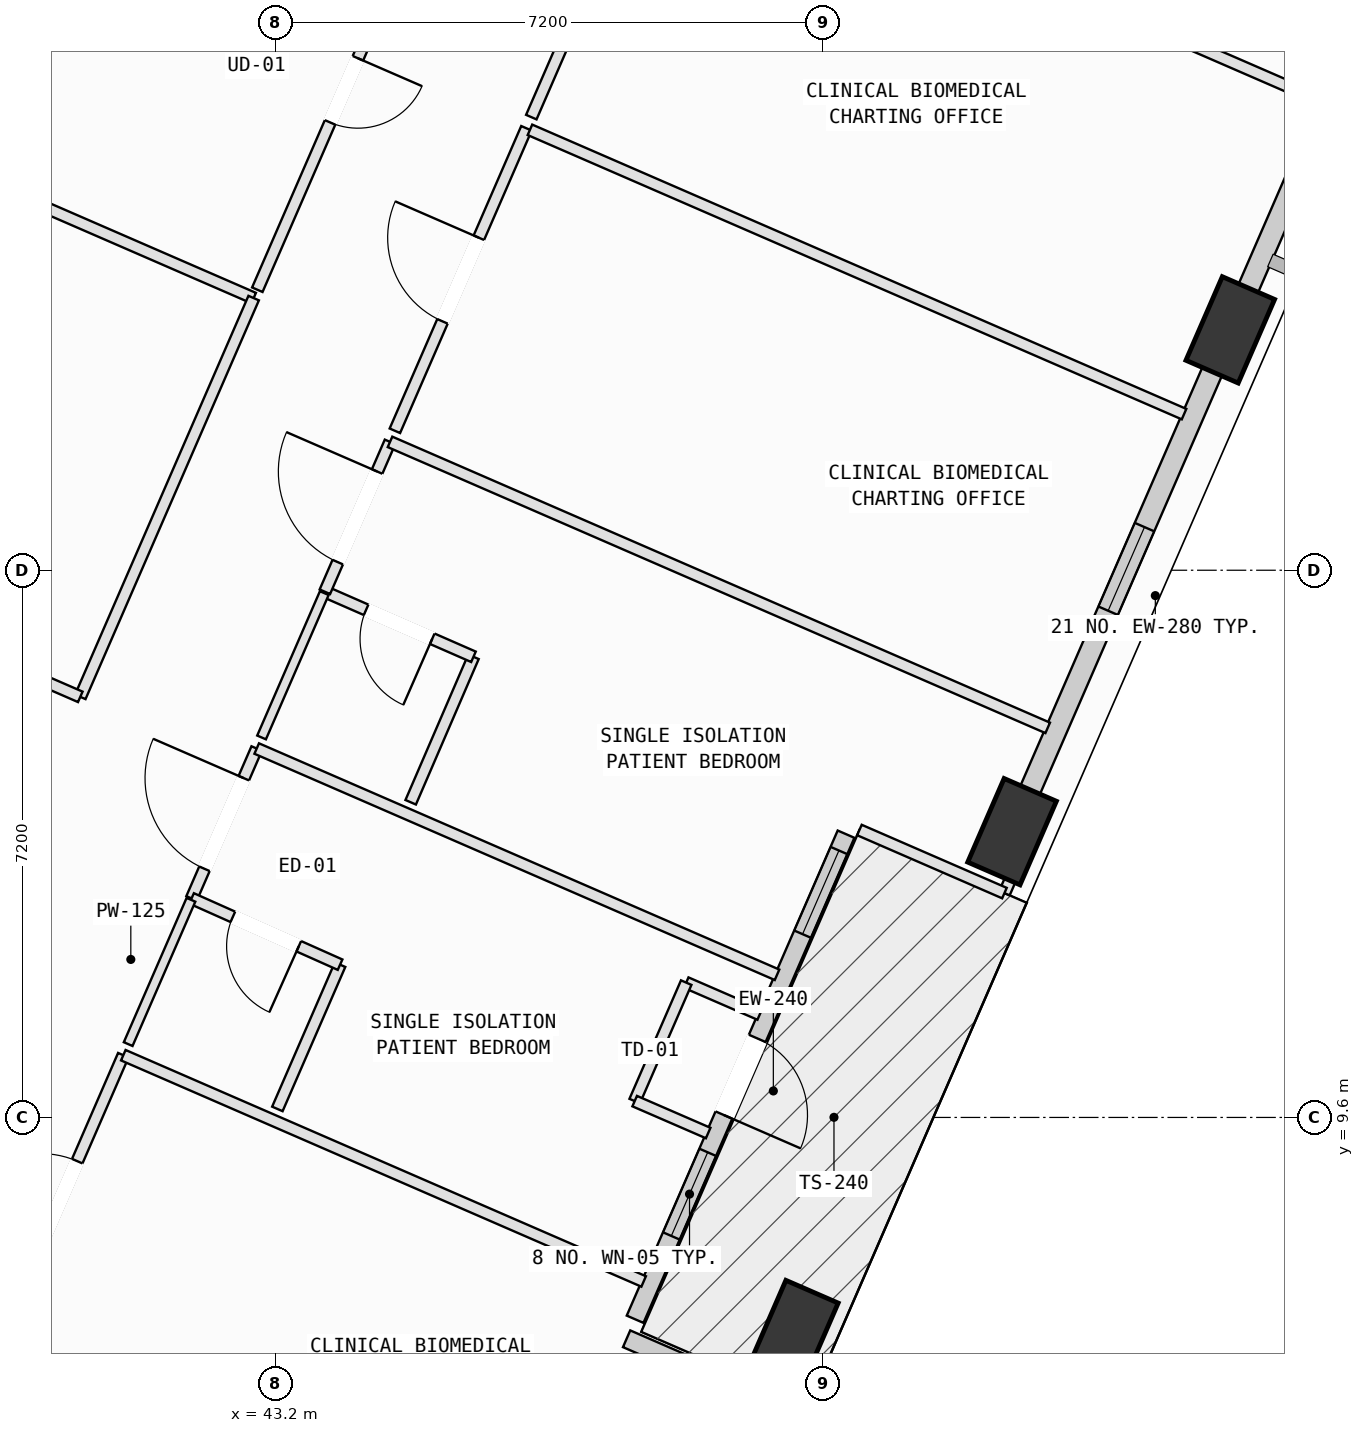
"""IFC4 building model, lengths in metres.
Left out: names, types, materials, properties, quantities, classifications, styles, units other than length and angle.
Written with IfcOpenShell. Run it as: python <this file> out.ifc"""

import sys

from ifc_helpers import new_model, si_unit, direction, frame, frame_2d, origin, origin_2d, place, context, subcontext, project, spatial, rectangle, extrude, element, fill, save


model = new_model("IFC4")
c1 = context("Model", 3, precision=1e-05, world=origin(), true_north=direction((0.0, 1.0)))
c2 = subcontext(c1, "Body", "Model", "MODEL_VIEW")
j1 = project(units=[si_unit("LENGTHUNIT", "METRE"), si_unit("PLANEANGLEUNIT", "RADIAN")], contexts=[c1])
p1 = place(None, origin())
s1 = spatial("IfcSite", under=j1, at=p1, CompositionType="ELEMENT")
p2 = place(p1, origin())
s2 = spatial("IfcBuilding", under=s1, at=p2, CompositionType="ELEMENT")
p3 = place(p2, frame((0.0, 0.0, 320.6)))
s3 = spatial("IfcBuildingStorey", under=s2, at=p3, CompositionType="ELEMENT", Elevation=320.6)
for number, where, z_axis, x_axis in (
    (1, (50.017, 6.757, 0.002), (0.0, 0.0, 1.0), (0.399, 0.917, 0.0)),
    (2, (52.888, 13.36, 0.002), (0.0, 0.0, 1.0), (0.399, 0.917, 0.0)),
    (3, (55.759, 19.963, 0.002), (0.0, 0.0, 1.0), (0.399, 0.917, 0.0)),
):
    element("IfcColumn", number, at=place(p3, frame(where, z_axis=z_axis, x_axis=x_axis)), inside=s3, PredefinedType="COLUMN", context=c2, shape_type="SweptSolid", body=[
        extrude(rectangle(XDim=1.2, YDim=0.75, at=origin_2d()), origin(), (0.0, 0.0, 1.0), 3.996),
    ])
p4 = place(p3, frame((50.704, 13.327, 0.0), z_axis=(0.0, 0.0, 1.0), x_axis=(-0.398727394062, -0.917069498579, 0.0)))
e4 = element("IfcWall", 4, at=p4, inside=s3, PredefinedType="SOLIDWALL", context=c2, shape_type="SweptSolid", body=[
    extrude(rectangle(XDim=6.96, YDim=0.24, at=frame_2d((3.48, 0.0))), origin(), (0.0, 0.0, 1.0), 3.265),
])
p5 = place(p4, frame((2.93, 0.0, 0.0)))
e5 = element("IfcOpeningElement", 5, at=p5, cuts=e4, PredefinedType="OPENING", context=c2, shape_type="SweptSolid", body=[
    extrude(rectangle(XDim=1.1, YDim=2.15, at=frame_2d((0.55, 1.075))), frame((0.0, 0.13, 0.0), z_axis=(0.0, -1.0, 0.0), x_axis=(1.0, 0.0, 0.0)), (0.0, 0.0, 1.0), 0.26),
])
p6 = place(p4, frame((4.564, 0.0, 0.75)))
e6 = element("IfcOpeningElement", 6, at=p6, cuts=e4, PredefinedType="OPENING", context=c2, shape_type="SweptSolid", body=[
    extrude(rectangle(XDim=1.2, YDim=1.75, at=frame_2d((0.6, 0.875))), frame((0.0, 0.13, 0.0), z_axis=(0.0, -1.0, 0.0), x_axis=(1.0, 0.0, 0.0)), (0.0, 0.0, 1.0), 0.26),
])
p7 = place(p4, frame((0.235, 0.0, 0.75)))
e7 = element("IfcOpeningElement", 7, at=p7, cuts=e4, PredefinedType="OPENING", context=c2, shape_type="SweptSolid", body=[
    extrude(rectangle(XDim=1.2, YDim=1.75, at=frame_2d((0.6, 0.875))), frame((0.0, 0.13, 0.0), z_axis=(0.0, -1.0, 0.0), x_axis=(1.0, 0.0, 0.0)), (0.0, 0.0, 1.0), 0.26),
])
p8 = place(p3, frame((47.817, 6.688, 0.0), z_axis=(0.0, 0.0, 1.0), x_axis=(0.917071608779, -0.398722540586, 0.0)))
e8 = element("IfcWall", 8, at=p8, inside=s3, PredefinedType="SOLIDWALL", context=c2, shape_type="SweptSolid", body=[
    extrude(rectangle(XDim=2.5, YDim=0.24, at=frame_2d((1.25, 0.0))), origin(), (0.0, 0.0, 1.0), 2.765),
])
p9 = place(p3, frame((55.601, 19.598, 0.0), z_axis=(0.0, 0.0, 1.0), x_axis=(-0.398744230651, -0.917062178112, 0.0)))
e9 = element("IfcWall", 9, at=p9, inside=s3, PredefinedType="SOLIDWALL", context=c2, shape_type="SweptSolid", body=[
    extrude(rectangle(XDim=6.405, YDim=0.28, at=frame_2d((3.203, 0.0))), origin(), (0.0, 0.0, 1.0), 3.245),
])
p10 = place(p9, frame((2.432, 0.0, 0.75)))
e10 = element("IfcOpeningElement", 10, at=p10, cuts=e9, PredefinedType="OPENING", context=c2, shape_type="SweptSolid", body=[
    extrude(rectangle(XDim=1.2, YDim=1.75, at=frame_2d((0.6, 0.875))), frame((0.0, 0.15, 0.0), z_axis=(0.0, -1.0, 0.0), x_axis=(1.0, 0.0, 0.0)), (0.0, 0.0, 1.0), 0.3),
])
p11 = place(p3, frame((58.472, 26.201, 0.0), z_axis=(0.0, 0.0, 1.0), x_axis=(-0.398776286617, -0.917048239316, 0.0)))
e11 = element("IfcWall", 11, at=p11, inside=s3, PredefinedType="SOLIDWALL", context=c2, shape_type="SweptSolid", body=[
    extrude(rectangle(XDim=6.405, YDim=0.28, at=frame_2d((3.203, 0.0))), origin(), (0.0, 0.0, 1.0), 3.245),
])
p12 = place(p11, frame((0.796, 0.0, 0.75)))
e12 = element("IfcOpeningElement", 12, at=p12, cuts=e11, PredefinedType="OPENING", context=c2, shape_type="SweptSolid", body=[
    extrude(rectangle(XDim=1.6, YDim=1.95, at=frame_2d((0.8, 0.975))), frame((0.0, 0.15, 0.0), z_axis=(0.0, -1.0, 0.0), x_axis=(1.0, 0.0, 0.0)), (0.0, 0.0, 1.0), 0.3),
])
p13 = place(p3, frame((39.505, 6.53, 0.0), z_axis=(0.0, 0.0, 1.0), x_axis=(0.398597683129, 0.917125883946, 0.0)))
e13 = element("IfcWall", 13, at=p13, inside=s3, PredefinedType="PARTITIONING", context=c2, shape_type="SweptSolid", body=[
    extrude(rectangle(XDim=4.24, YDim=0.15, at=frame_2d((2.12, 0.0))), origin(), (0.0, 0.0, 1.0), 3.78),
])
p14 = place(p13, frame((1.52, 0.0, 0.0)))
e14 = element("IfcOpeningElement", 14, at=p14, cuts=e13, PredefinedType="OPENING", context=c2, shape_type="SweptSolid", body=[
    extrude(rectangle(XDim=1.2, YDim=2.15, at=frame_2d((0.6, 1.075))), frame((0.0, 0.085, 0.0), z_axis=(0.0, -1.0, 0.0), x_axis=(1.0, 0.0, 0.0)), (0.0, 0.0, 1.0), 0.17),
])
p15 = place(p3, frame((41.195, 10.419, 0.0), z_axis=(0.0, 0.0, 1.0), x_axis=(0.917043017742, -0.398788294224, 0.0)))
e15 = element("IfcWall", 15, at=p15, inside=s3, PredefinedType="PARTITIONING", context=c2, shape_type="SweptSolid", body=[
    extrude(rectangle(XDim=7.465, YDim=0.15, at=frame_2d((3.733, 0.0))), origin(), (0.0, 0.0, 1.0), 3.78),
])
p16 = place(p3, frame((42.093, 12.482, 0.0), z_axis=(0.0, 0.0, 1.0), x_axis=(0.398518519728, 0.917160285574, 0.0)))
e16 = element("IfcWall", 16, at=p16, inside=s3, PredefinedType="PARTITIONING", context=c2, shape_type="SweptSolid", body=[
    extrude(rectangle(XDim=2.15, YDim=0.15, at=frame_2d((1.075, 0.0))), origin(), (0.0, 0.0, 1.0), 3.78),
])
p17 = place(p16, frame((0.425, 0.0, 0.0)))
e17 = element("IfcOpeningElement", 17, at=p17, cuts=e16, PredefinedType="OPENING", context=c2, shape_type="SweptSolid", body=[
    extrude(rectangle(XDim=1.3, YDim=2.15, at=frame_2d((0.65, 1.075))), frame((0.0, 0.085, 0.0), z_axis=(0.0, -1.0, 0.0), x_axis=(1.0, 0.0, 0.0)), (0.0, 0.0, 1.0), 0.17),
])
p18 = place(p3, frame((42.95, 14.454, 0.0), z_axis=(0.0, 0.0, 1.0), x_axis=(0.917043017742, -0.398788294224, 0.0)))
e18 = element("IfcWall", 18, at=p18, inside=s3, PredefinedType="PARTITIONING", context=c2, shape_type="SweptSolid", body=[
    extrude(rectangle(XDim=7.465, YDim=0.15, at=frame_2d((3.733, 0.0))), origin(), (0.0, 0.0, 1.0), 3.78),
])
p19 = place(p3, frame((49.568, 10.954, 0.0), z_axis=(0.0, 0.0, 1.0), x_axis=(-0.917254037481, 0.398302687318, 0.0)))
e19 = element("IfcWall", 19, at=p19, inside=s3, PredefinedType="PARTITIONING", context=c2, shape_type="SweptSolid", body=[
    extrude(rectangle(XDim=1.054, YDim=0.15, at=frame_2d((0.527, 0.0))), origin(), (0.0, 0.0, 1.0), 3.78),
])
p20 = place(p3, frame((48.601, 11.374, 0.0), z_axis=(0.0, 0.0, 1.0), x_axis=(-0.398783871208, -0.917044941137, 0.0)))
e20 = element("IfcWall", 20, at=p20, inside=s3, PredefinedType="PARTITIONING", context=c2, shape_type="SweptSolid", body=[
    extrude(rectangle(XDim=1.7, YDim=0.15, at=frame_2d((0.85, 0.0))), origin(), (0.0, 0.0, 1.0), 3.78),
])
p21 = place(p3, frame((47.923, 9.815, 0.0), z_axis=(0.0, 0.0, 1.0), x_axis=(0.917217288132, -0.398387306966, 0.0)))
e21 = element("IfcWall", 21, at=p21, inside=s3, PredefinedType="PARTITIONING", context=c2, shape_type="SweptSolid", body=[
    extrude(rectangle(XDim=1.054, YDim=0.15, at=frame_2d((0.527, 0.0))), origin(), (0.0, 0.0, 1.0), 3.78),
])
p22 = place(p3, frame((43.222, 9.712, 0.0), z_axis=(0.0, 0.0, 1.0), x_axis=(0.398682980107, 0.91708880779, 0.0)))
e22 = element("IfcWall", 22, at=p22, inside=s3, PredefinedType="PARTITIONING", context=c2, shape_type="SweptSolid", body=[
    extrude(rectangle(XDim=2.07, YDim=0.15, at=frame_2d((1.035, 0.0))), origin(), (0.0, 0.0, 1.0), 3.415),
])
p23 = place(p3, frame((44.047, 11.61, 0.0), z_axis=(0.0, 0.0, 1.0), x_axis=(-0.913231902411, 0.407440170354, 0.0)))
e23 = element("IfcWall", 23, at=p23, inside=s3, PredefinedType="PARTITIONING", context=c2, shape_type="SweptSolid", body=[
    extrude(rectangle(XDim=2.14, YDim=0.15, at=frame_2d((1.07, 0.0))), origin(), (0.0, 0.0, 1.0), 3.78),
])
p24 = place(p23, frame((0.595, 0.0, 0.0)))
e24 = element("IfcOpeningElement", 24, at=p24, cuts=e23, PredefinedType="OPENING", context=c2, shape_type="SweptSolid", body=[
    extrude(rectangle(XDim=0.95, YDim=2.1, at=frame_2d((0.475, 1.05))), frame((0.0, 0.085, 0.0), z_axis=(0.0, -1.0, 0.0), x_axis=(1.0, 0.0, 0.0)), (0.0, 0.0, 1.0), 0.17),
])
p25 = place(p3, frame((41.259, 10.565, 0.0), z_axis=(0.0, 0.0, 1.0), x_axis=(0.398808011477, 0.917034443182, 0.0)))
e25 = element("IfcWall", 25, at=p25, inside=s3, PredefinedType="PARTITIONING", context=c2, shape_type="SweptSolid", body=[
    extrude(rectangle(XDim=2.071, YDim=0.125, at=frame_2d((1.036, 0.0))), origin(), (0.0, 0.0, 1.0), 3.78),
])
p26 = place(p3, frame((44.976, 13.747, 0.0), z_axis=(0.0, 0.0, 1.0), x_axis=(0.396236327193, 0.918148557159, 0.0)))
e26 = element("IfcWall", 26, at=p26, inside=s3, PredefinedType="PARTITIONING", context=c2, shape_type="SweptSolid", body=[
    extrude(rectangle(XDim=2.084, YDim=0.15, at=frame_2d((1.042, 0.0))), origin(), (0.0, 0.0, 1.0), 3.78),
])
p27 = place(p3, frame((45.802, 15.661, 0.0), z_axis=(0.0, 0.0, 1.0), x_axis=(-0.916010257987, 0.401154842003, 0.0)))
e27 = element("IfcWall", 27, at=p27, inside=s3, PredefinedType="PARTITIONING", context=c2, shape_type="SweptSolid", body=[
    extrude(rectangle(XDim=2.134, YDim=0.15, at=frame_2d((1.067, 0.0))), origin(), (0.0, 0.0, 1.0), 3.78),
])
p28 = place(p27, frame((0.592, 0.0, 0.0)))
e28 = element("IfcOpeningElement", 28, at=p28, cuts=e27, PredefinedType="OPENING", context=c2, shape_type="SweptSolid", body=[
    extrude(rectangle(XDim=0.95, YDim=2.1, at=frame_2d((0.475, 1.05))), frame((0.0, 0.085, 0.0), z_axis=(0.0, -1.0, 0.0), x_axis=(1.0, 0.0, 0.0)), (0.0, 0.0, 1.0), 0.17),
])
p29 = place(p3, frame((43.847, 16.517, 0.0), z_axis=(0.0, 0.0, 1.0), x_axis=(0.398655528378, 0.917100741301, 0.0)))
e29 = element("IfcWall", 29, at=p29, inside=s3, PredefinedType="PARTITIONING", context=c2, shape_type="SweptSolid", body=[
    extrude(rectangle(XDim=2.15, YDim=0.15, at=frame_2d((1.075, 0.0))), origin(), (0.0, 0.0, 1.0), 3.78),
])
p30 = place(p29, frame((0.425, 0.0, 0.0)))
e30 = element("IfcOpeningElement", 30, at=p30, cuts=e29, PredefinedType="OPENING", context=c2, shape_type="SweptSolid", body=[
    extrude(rectangle(XDim=1.3, YDim=2.15, at=frame_2d((0.65, 1.075))), frame((0.0, 0.085, 0.0), z_axis=(0.0, -1.0, 0.0), x_axis=(1.0, 0.0, 0.0)), (0.0, 0.0, 1.0), 0.17),
])
p31 = place(p3, frame((44.704, 18.489, 0.0), z_axis=(0.0, 0.0, 1.0), x_axis=(0.917037556052, -0.398800853547, 0.0)))
e31 = element("IfcWall", 31, at=p31, inside=s3, PredefinedType="PARTITIONING", context=c2, shape_type="SweptSolid", body=[
    extrude(rectangle(XDim=9.436, YDim=0.15, at=frame_2d((4.718, 0.0))), origin(), (0.0, 0.0, 1.0), 3.78),
])
p32 = place(p3, frame((53.258, 13.633, 0.0), z_axis=(0.0, 0.0, 1.0), x_axis=(-0.398688245034, -0.917086518967, 0.0)))
e32 = element("IfcWall", 32, at=p32, inside=s3, PredefinedType="PARTITIONING", context=c2, shape_type="SweptSolid", body=[
    extrude(rectangle(XDim=1.179, YDim=0.15, at=frame_2d((0.589, 0.0))), origin(), (0.0, 0.0, 1.0), 3.245),
])
p33 = place(p3, frame((52.788, 12.552, 0.0), z_axis=(0.0, 0.0, 1.0), x_axis=(-0.91699543107, 0.39889770543, 0.0)))
e33 = element("IfcWall", 33, at=p33, inside=s3, PredefinedType="PARTITIONING", context=c2, shape_type="SweptSolid", body=[
    extrude(rectangle(XDim=2.081, YDim=0.15, at=frame_2d((1.041, 0.0))), origin(), (0.0, 0.0, 1.0), 3.78),
])
p34 = place(p3, frame((43.014, 14.6, 0.0), z_axis=(0.0, 0.0, 1.0), x_axis=(0.398553636867, 0.917145025904, 0.0)))
e34 = element("IfcWall", 34, at=p34, inside=s3, PredefinedType="PARTITIONING", context=c2, shape_type="SweptSolid", body=[
    extrude(rectangle(XDim=2.071, YDim=0.125, at=frame_2d((1.035, 0.0))), origin(), (0.0, 0.0, 1.0), 3.78),
])
p35 = place(p3, frame((44.768, 18.635, 0.0), z_axis=(0.0, 0.0, 1.0), x_axis=(0.398828954963, 0.91702533481, 0.0)))
e35 = element("IfcWall", 35, at=p35, inside=s3, PredefinedType="PARTITIONING", context=c2, shape_type="SweptSolid", body=[
    extrude(rectangle(XDim=4.34, YDim=0.15, at=frame_2d((2.17, 0.0))), origin(), (0.0, 0.0, 1.0), 3.415),
])
p36 = place(p35, frame((1.57, 0.0, 0.0)))
e36 = element("IfcOpeningElement", 36, at=p36, cuts=e35, PredefinedType="OPENING", context=c2, shape_type="SweptSolid", body=[
    extrude(rectangle(XDim=1.2, YDim=2.15, at=frame_2d((0.6, 1.075))), frame((0.0, 0.085, 0.0), z_axis=(0.0, -1.0, 0.0), x_axis=(1.0, 0.0, 0.0)), (0.0, 0.0, 1.0), 0.17),
])
p37 = place(p3, frame((46.545, 22.595, 0.0), z_axis=(0.0, 0.0, 1.0), x_axis=(0.917099421132, -0.39865856539, 0.0)))
e37 = element("IfcWall", 37, at=p37, inside=s3, PredefinedType="PARTITIONING", context=c2, shape_type="SweptSolid", body=[
    extrude(rectangle(XDim=9.384, YDim=0.15, at=frame_2d((4.692, 0.0))), origin(), (0.0, 0.0, 1.0), 3.78),
])
p38 = place(p3, frame((46.563, 22.762, 0.0), z_axis=(0.0, 0.0, 1.0), x_axis=(0.398639711207, 0.917107616722, 0.0)))
e38 = element("IfcWall", 38, at=p38, inside=s3, PredefinedType="PARTITIONING", context=c2, shape_type="SweptSolid", body=[
    extrude(rectangle(XDim=4.34, YDim=0.15, at=frame_2d((2.17, 0.0))), origin(), (0.0, 0.0, 1.0), 3.415),
])
p39 = place(p38, frame((1.57, 0.0, 0.0)))
e39 = element("IfcOpeningElement", 39, at=p39, cuts=e38, PredefinedType="OPENING", context=c2, shape_type="SweptSolid", body=[
    extrude(rectangle(XDim=1.2, YDim=2.15, at=frame_2d((0.6, 1.075))), frame((0.0, 0.085, 0.0), z_axis=(0.0, -1.0, 0.0), x_axis=(1.0, 0.0, 0.0)), (0.0, 0.0, 1.0), 0.17),
])
p40 = place(p3, frame((48.293, 26.742, 0.0), z_axis=(0.0, 0.0, 1.0), x_axis=(0.917063062267, -0.398742197197, 0.0)))
e40 = element("IfcWall", 40, at=p40, inside=s3, PredefinedType="PARTITIONING", context=c2, shape_type="SweptSolid", body=[
    extrude(rectangle(XDim=9.435, YDim=0.15, at=frame_2d((4.717, 0.0))), origin(), (0.0, 0.0, 1.0), 3.78),
])
p41 = place(p3, frame((56.128, 20.236, 0.0), z_axis=(0.0, 0.0, 1.0), x_axis=(-0.398658726612, -0.91709935105, 0.0)))
e41 = element("IfcWall", 41, at=p41, inside=s3, PredefinedType="PARTITIONING", context=c2, shape_type="SweptSolid", body=[
    extrude(rectangle(XDim=0.795, YDim=0.15, at=frame_2d((0.397, 0.0))), origin(), (0.0, 0.0, 1.0), 3.245),
])
p42 = place(p3, frame((34.808, 23.904, 0.0), z_axis=(0.0, 0.0, 1.0), x_axis=(0.917052481723, -0.398766530398, 0.0)))
e42 = element("IfcWall", 42, at=p42, inside=s3, PredefinedType="PARTITIONING", context=c2, shape_type="SweptSolid", body=[
    extrude(rectangle(XDim=8.835, YDim=0.15, at=frame_2d((4.417, 0.0))), origin(), (0.0, 0.0, 1.0), 3.78),
])
p43 = place(p3, frame((42.91, 20.381, 0.0), z_axis=(0.0, 0.0, 1.0), x_axis=(-0.398677741034, -0.917091085337, 0.0)))
e43 = element("IfcWall", 43, at=p43, inside=s3, PredefinedType="PARTITIONING", context=c2, shape_type="SweptSolid", body=[
    extrude(rectangle(XDim=5.721, YDim=0.15, at=frame_2d((2.861, 0.0))), origin(), (0.0, 0.0, 1.0), 3.78),
])
p44 = place(p3, frame((40.629, 15.134, 0.0), z_axis=(0.0, 0.0, 1.0), x_axis=(-0.916933705125, 0.399039572481, 0.0)))
e44 = element("IfcWall", 44, at=p44, inside=s3, PredefinedType="PARTITIONING", context=c2, shape_type="SweptSolid", body=[
    extrude(rectangle(XDim=1.253, YDim=0.15, at=frame_2d((0.626, 0.0))), origin(), (0.0, 0.0, 1.0), 3.78),
])
p45 = place(p3, frame((45.239, 25.738, 0.0), z_axis=(0.0, 0.0, 1.0), x_axis=(-0.398677741034, -0.917091085337, 0.0)))
e45 = element("IfcWall", 45, at=p45, inside=s3, PredefinedType="PARTITIONING", context=c2, shape_type="SweptSolid", body=[
    extrude(rectangle(XDim=5.721, YDim=0.15, at=frame_2d((2.861, 0.0))), origin(), (0.0, 0.0, 1.0), 3.78),
])
p46 = place(p45, frame((2.401, 0.0, 0.0)))
e46 = element("IfcOpeningElement", 46, at=p46, cuts=e45, PredefinedType="OPENING", context=c2, shape_type="SweptSolid", body=[
    extrude(rectangle(XDim=0.92, YDim=2.1, at=frame_2d((0.46, 1.05))), frame((0.0, 0.085, 0.0), z_axis=(0.0, -1.0, 0.0), x_axis=(1.0, 0.0, 0.0)), (0.0, 0.0, 1.0), 0.17),
])
p47 = place(p5, origin())
e47 = element("IfcDoor", 47, at=p47, inside=s3, OperationType="SINGLE_SWING_RIGHT", PredefinedType="DOOR", context=c2, shape_type="SweptSolid", body=[
    extrude(rectangle(XDim=1.1, YDim=2.15, at=frame_2d((0.55, 1.075))), frame((0.0, 0.025, 0.0), z_axis=(0.0, -1.0, 0.0), x_axis=(1.0, 0.0, 0.0)), (0.0, 0.0, 1.0), 0.05),
])
fill(e5, e47)
p48 = place(p6, origin())
e48 = element("IfcWindow", 48, at=p48, inside=s3, PartitioningType="SINGLE_PANEL", PredefinedType="WINDOW", context=c2, shape_type="SweptSolid", body=[
    extrude(rectangle(XDim=1.2, YDim=1.75, at=frame_2d((0.6, 0.875))), frame((0.0, 0.03, 0.0), z_axis=(0.0, -1.0, 0.0), x_axis=(1.0, 0.0, 0.0)), (0.0, 0.0, 1.0), 0.06),
])
fill(e6, e48)
p49 = place(p7, origin())
e49 = element("IfcWindow", 49, at=p49, inside=s3, PartitioningType="SINGLE_PANEL", PredefinedType="WINDOW", context=c2, shape_type="SweptSolid", body=[
    extrude(rectangle(XDim=1.2, YDim=1.75, at=frame_2d((0.6, 0.875))), frame((0.0, 0.03, 0.0), z_axis=(0.0, -1.0, 0.0), x_axis=(1.0, 0.0, 0.0)), (0.0, 0.0, 1.0), 0.06),
])
fill(e7, e49)
p50 = place(p10, origin())
e50 = element("IfcWindow", 50, at=p50, inside=s3, PartitioningType="SINGLE_PANEL", PredefinedType="WINDOW", context=c2, shape_type="SweptSolid", body=[
    extrude(rectangle(XDim=1.2, YDim=1.75, at=frame_2d((0.6, 0.875))), frame((0.0, 0.03, 0.0), z_axis=(0.0, -1.0, 0.0), x_axis=(1.0, 0.0, 0.0)), (0.0, 0.0, 1.0), 0.06),
])
fill(e10, e50)
p51 = place(p14, origin())
e51 = element("IfcDoor", 51, at=p51, inside=s3, OperationType="SINGLE_SWING_LEFT", PredefinedType="DOOR", context=c2, shape_type="SweptSolid", body=[
    extrude(rectangle(XDim=1.2, YDim=2.15, at=frame_2d((0.6, 1.075))), frame((0.0, 0.025, 0.0), z_axis=(0.0, -1.0, 0.0), x_axis=(1.0, 0.0, 0.0)), (0.0, 0.0, 1.0), 0.05),
])
fill(e14, e51)
p52 = place(p17, origin())
e52 = element("IfcDoor", 52, at=p52, inside=s3, OperationType="SINGLE_SWING_RIGHT", PredefinedType="DOOR", context=c2, shape_type="SweptSolid", body=[
    extrude(rectangle(XDim=1.3, YDim=2.15, at=frame_2d((0.65, 1.075))), frame((0.0, 0.025, 0.0), z_axis=(0.0, -1.0, 0.0), x_axis=(1.0, 0.0, 0.0)), (0.0, 0.0, 1.0), 0.05),
])
fill(e17, e52)
p53 = place(p24, origin())
e53 = element("IfcDoor", 53, at=p53, inside=s3, OperationType="SINGLE_SWING_LEFT", PredefinedType="DOOR", context=c2, shape_type="SweptSolid", body=[
    extrude(rectangle(XDim=0.95, YDim=2.1, at=frame_2d((0.475, 1.05))), frame((0.0, 0.025, 0.0), z_axis=(0.0, -1.0, 0.0), x_axis=(1.0, 0.0, 0.0)), (0.0, 0.0, 1.0), 0.05),
])
fill(e24, e53)
p54 = place(p30, origin())
e54 = element("IfcDoor", 54, at=p54, inside=s3, OperationType="SINGLE_SWING_RIGHT", PredefinedType="DOOR", context=c2, shape_type="SweptSolid", body=[
    extrude(rectangle(XDim=1.3, YDim=2.15, at=frame_2d((0.65, 1.075))), frame((0.0, 0.025, 0.0), z_axis=(0.0, -1.0, 0.0), x_axis=(1.0, 0.0, 0.0)), (0.0, 0.0, 1.0), 0.05),
])
fill(e30, e54)
p55 = place(p28, origin())
e55 = element("IfcDoor", 55, at=p55, inside=s3, OperationType="SINGLE_SWING_LEFT", PredefinedType="DOOR", context=c2, shape_type="SweptSolid", body=[
    extrude(rectangle(XDim=0.95, YDim=2.1, at=frame_2d((0.475, 1.05))), frame((0.0, 0.025, 0.0), z_axis=(0.0, -1.0, 0.0), x_axis=(1.0, 0.0, 0.0)), (0.0, 0.0, 1.0), 0.05),
])
fill(e28, e55)
p56 = place(p36, origin())
e56 = element("IfcDoor", 56, at=p56, inside=s3, OperationType="SINGLE_SWING_RIGHT", PredefinedType="DOOR", context=c2, shape_type="SweptSolid", body=[
    extrude(rectangle(XDim=1.2, YDim=2.15, at=frame_2d((0.6, 1.075))), frame((0.0, 0.025, 0.0), z_axis=(0.0, -1.0, 0.0), x_axis=(1.0, 0.0, 0.0)), (0.0, 0.0, 1.0), 0.05),
])
fill(e36, e56)
p57 = place(p46, origin())
e57 = element("IfcDoor", 57, at=p57, inside=s3, OperationType="SINGLE_SWING_LEFT", PredefinedType="DOOR", context=c2, shape_type="SweptSolid", body=[
    extrude(rectangle(XDim=0.92, YDim=2.1, at=frame_2d((0.46, 1.05))), frame((0.0, 0.025, 0.0), z_axis=(0.0, -1.0, 0.0), x_axis=(1.0, 0.0, 0.0)), (0.0, 0.0, 1.0), 0.05),
])
fill(e46, e57)
save(model, sys.argv[1])
